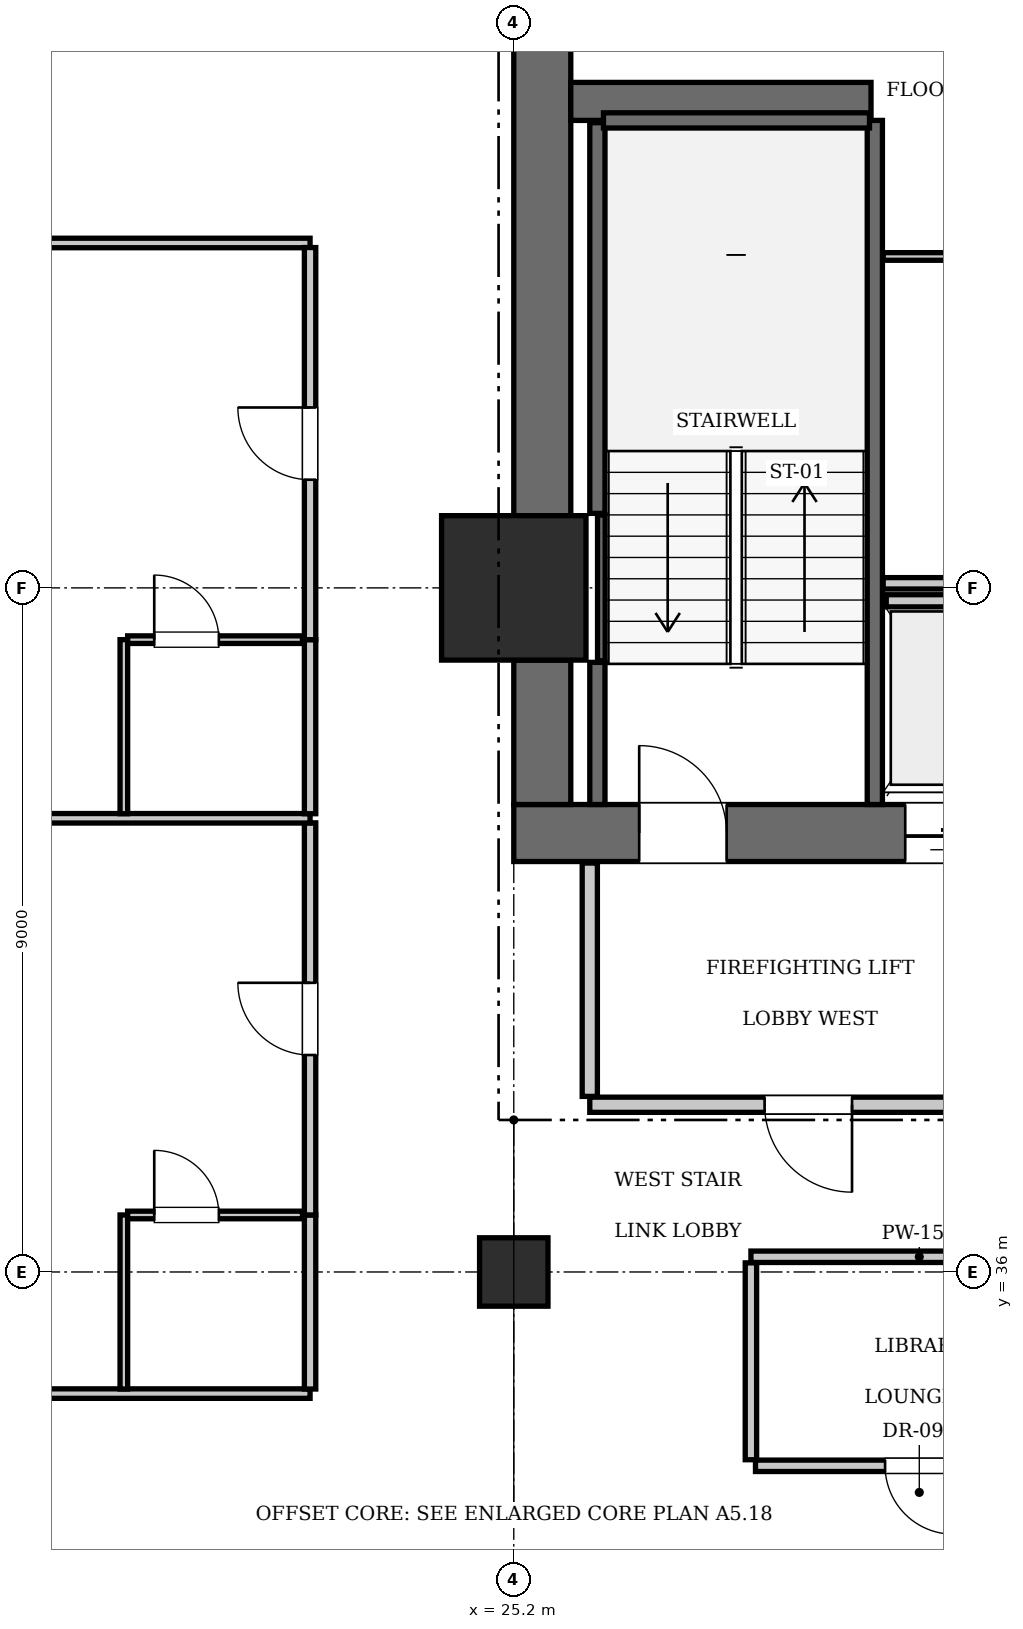
"""IFC4 building model, lengths in metres.
Left out: names, types, materials, properties, quantities, classifications, styles, units other than length and angle.
Written with IfcOpenShell. Run it as: python <this file> out.ifc"""

import sys

from ifc_helpers import new_model, si_unit, direction, frame, frame_2d, origin, origin_2d, place, context, subcontext, project, spatial, rectangle, extrude, element, fill, save


model = new_model("IFC4")
c1 = context("Model", 3, precision=1e-05, world=origin(), true_north=direction((0.0, 1.0)))
c2 = subcontext(c1, "Body", "Model", "MODEL_VIEW")
j1 = project(units=[si_unit("LENGTHUNIT", "METRE"), si_unit("PLANEANGLEUNIT", "RADIAN")], contexts=[c1])
p1 = place(None, origin())
s1 = spatial("IfcSite", under=j1, at=p1, CompositionType="ELEMENT")
p2 = place(p1, origin())
s2 = spatial("IfcBuilding", under=s1, at=p2, CompositionType="ELEMENT")
p3 = place(p2, frame((0.0, 0.0, 189.0)))
s3 = spatial("IfcBuildingStorey", under=s2, at=p3, CompositionType="ELEMENT", Elevation=189.0)
p4 = place(p3, frame((25.2, 45.0, 0.0), z_axis=(0.0, 0.0, 1.0), x_axis=(1.0, 0.0, 0.0)))
e1 = element("IfcColumn", 1, at=p4, inside=s3, PredefinedType="COLUMN", context=c2, shape_type="SweptSolid", body=[
    extrude(rectangle(XDim=1.9, YDim=1.9, at=origin_2d()), origin(), (0.0, 0.0, 1.0), 3.85),
])
p5 = place(p3, frame((25.2, 41.775, 0.0), z_axis=(0.0, 0.0, 1.0), x_axis=(1.0, 0.0, 0.0)))
e2 = element("IfcWall", 2, at=p5, inside=s3, PredefinedType="SHEAR", context=c2, shape_type="SweptSolid", body=[
    extrude(rectangle(XDim=6.8, YDim=0.75, at=frame_2d((3.4, 0.0))), origin(), (0.0, 0.0, 1.0), 3.85),
])
p6 = place(p5, frame((1.65, 0.0, 0.0)))
e3 = element("IfcOpeningElement", 3, at=p6, cuts=e2, PredefinedType="OPENING", context=c2, shape_type="SweptSolid", body=[
    extrude(rectangle(XDim=1.15, YDim=2.15, at=frame_2d((0.575, 1.075))), frame((0.0, 0.385, 0.0), z_axis=(0.0, -1.0, 0.0), x_axis=(1.0, 0.0, 0.0)), (0.0, 0.0, 1.0), 0.77),
])
p7 = place(p5, frame((5.15, 0.0, 0.0)))
e4 = element("IfcOpeningElement", 4, at=p7, cuts=e2, PredefinedType="OPENING", context=c2, shape_type="SweptSolid", body=[
    extrude(rectangle(XDim=1.1, YDim=2.2, at=frame_2d((0.55, 1.1))), frame((0.0, 0.385, 0.0), z_axis=(0.0, -1.0, 0.0), x_axis=(1.0, 0.0, 0.0)), (0.0, 0.0, 1.0), 0.77),
])
p8 = place(p3, frame((25.575, 42.15, 0.0), z_axis=(0.0, 0.0, 1.0), x_axis=(0.0, 1.0, 0.0)))
e5 = element("IfcWall", 5, at=p8, inside=s3, PredefinedType="SHEAR", context=c2, shape_type="SweptSolid", body=[
    extrude(rectangle(XDim=1.9, YDim=0.75, at=frame_2d((0.95, 0.0))), origin(), (0.0, 0.0, 1.0), 3.85),
])
p9 = place(p3, frame((25.575, 45.95, 0.0), z_axis=(0.0, 0.0, 1.0), x_axis=(0.0, 1.0, 0.0)))
e6 = element("IfcWall", 6, at=p9, inside=s3, PredefinedType="SHEAR", context=c2, shape_type="SweptSolid", body=[
    extrude(rectangle(XDim=7.3, YDim=0.75, at=frame_2d((3.65, 0.0))), origin(), (0.0, 0.0, 1.0), 3.85),
])
p10 = place(p3, frame((25.95, 51.4, 0.0), z_axis=(0.0, 0.0, 1.0), x_axis=(1.0, 0.0, 0.0)))
e7 = element("IfcWall", 7, at=p10, inside=s3, PredefinedType="SHEAR", context=c2, shape_type="SweptSolid", body=[
    extrude(rectangle(XDim=3.95, YDim=0.5, at=frame_2d((1.975, 0.0))), origin(), (0.0, 0.0, 1.0), 3.85),
])
p11 = place(p3, frame((25.2, 36.0, 0.0), z_axis=(0.0, 0.0, 1.0), x_axis=(1.0, 0.0, 0.0)))
e8 = element("IfcColumn", 8, at=p11, inside=s3, PredefinedType="COLUMN", context=c2, shape_type="SweptSolid", body=[
    extrude(rectangle(XDim=0.9, YDim=0.9, at=origin_2d()), origin(), (0.0, 0.0, 1.0), 3.85),
])
p12 = place(p3, frame((29.95, 42.15, 0.0), z_axis=(0.0, 0.0, 1.0), x_axis=(0.0, 1.0, 0.0)))
e9 = element("IfcWall", 9, at=p12, inside=s3, PredefinedType="SOLIDWALL", context=c2, shape_type="SweptSolid", body=[
    extrude(rectangle(XDim=9.0, YDim=0.2, at=frame_2d((4.5, 0.0))), origin(), (0.0, 0.0, 1.0), 3.61),
])
p13 = place(p3, frame((26.3, 42.15, 0.0), z_axis=(0.0, 0.0, 1.0), x_axis=(0.0, 1.0, 0.0)))
e10 = element("IfcWall", 10, at=p13, inside=s3, PredefinedType="SOLIDWALL", context=c2, shape_type="SweptSolid", body=[
    extrude(rectangle(XDim=1.87, YDim=0.2, at=frame_2d((0.935, 0.0))), origin(), (0.0, 0.0, 1.0), 3.61),
])
p14 = place(p3, frame((26.3, 45.98, 0.0), z_axis=(0.0, 0.0, 1.0), x_axis=(0.0, 1.0, 0.0)))
e11 = element("IfcWall", 11, at=p14, inside=s3, PredefinedType="SOLIDWALL", context=c2, shape_type="SweptSolid", body=[
    extrude(rectangle(XDim=5.14, YDim=0.2, at=frame_2d((2.57, 0.0))), origin(), (0.0, 0.0, 1.0), 3.61),
])
p15 = place(p3, frame((26.38, 51.15, 0.0), z_axis=(0.0, 0.0, 1.0), x_axis=(1.0, 0.0, 0.0)))
e12 = element("IfcWall", 12, at=p15, inside=s3, PredefinedType="SOLIDWALL", context=c2, shape_type="SweptSolid", body=[
    extrude(rectangle(XDim=3.5, YDim=0.2, at=frame_2d((1.75, 0.0))), origin(), (0.0, 0.0, 1.0), 3.61),
])
p16 = place(p3, frame((26.352, 44.04, 0.0), z_axis=(0.0, 0.0, 1.0), x_axis=(0.0, 1.0, 0.0)))
e13 = element("IfcWall", 13, at=p16, inside=s3, PredefinedType="SOLIDWALL", context=c2, shape_type="SweptSolid", body=[
    extrude(rectangle(XDim=1.92, YDim=0.1, at=frame_2d((0.96, 0.0))), origin(), (0.0, 0.0, 1.0), 3.61),
])
p17 = place(p3, frame((30.1, 44.83, 0.0), z_axis=(0.0, 0.0, 1.0), x_axis=(1.0, 0.0, 0.0)))
e14 = element("IfcWall", 14, at=p17, inside=s3, PredefinedType="SOLIDWALL", context=c2, shape_type="SweptSolid", body=[
    extrude(rectangle(XDim=1.6, YDim=0.16, at=frame_2d((0.8, 0.0))), origin(), (0.0, 0.0, 1.0), 3.61),
])
p18 = place(p3, frame((26.2, 38.2, 0.0), z_axis=(0.0, 0.0, 1.0), x_axis=(1.0, 0.0, 0.0)))
e15 = element("IfcWall", 15, at=p18, inside=s3, PredefinedType="PARTITIONING", context=c2, shape_type="SweptSolid", body=[
    extrude(rectangle(XDim=5.8, YDim=0.2, at=frame_2d((2.9, 0.0))), origin(), (0.0, 0.0, 1.0), 3.61),
])
p19 = place(p18, frame((2.3, 0.0, 0.0)))
e16 = element("IfcOpeningElement", 16, at=p19, cuts=e15, PredefinedType="OPENING", context=c2, shape_type="SweptSolid", body=[
    extrude(rectangle(XDim=1.15, YDim=2.15, at=frame_2d((0.575, 1.075))), frame((0.0, 0.11, 0.0), z_axis=(0.0, -1.0, 0.0), x_axis=(1.0, 0.0, 0.0)), (0.0, 0.0, 1.0), 0.22),
])
p20 = place(p3, frame((26.2, 38.31, 0.0), z_axis=(0.0, 0.0, 1.0), x_axis=(0.0, 1.0, 0.0)))
e17 = element("IfcWall", 17, at=p20, inside=s3, PredefinedType="PARTITIONING", context=c2, shape_type="SweptSolid", body=[
    extrude(rectangle(XDim=3.07, YDim=0.2, at=frame_2d((1.535, 0.0))), origin(), (0.0, 0.0, 1.0), 3.61),
])
p21 = place(p3, frame((30.06, 45.06, 0.0), z_axis=(0.0, 0.0, 1.0), x_axis=(1.0, 0.0, 0.0)))
e18 = element("IfcWall", 18, at=p21, inside=s3, PredefinedType="PARTITIONING", context=c2, shape_type="SweptSolid", body=[
    extrude(rectangle(XDim=3.18, YDim=0.15, at=frame_2d((1.59, 0.0))), origin(), (0.0, 0.0, 1.0), 3.61),
])
p22 = place(p3, frame((30.06, 49.36, 0.0), z_axis=(0.0, 0.0, 1.0), x_axis=(1.0, 0.0, 0.0)))
e19 = element("IfcWall", 19, at=p22, inside=s3, PredefinedType="PARTITIONING", context=c2, shape_type="SweptSolid", body=[
    extrude(rectangle(XDim=3.18, YDim=0.1, at=frame_2d((1.59, 0.0))), origin(), (0.0, 0.0, 1.0), 3.61),
])
p23 = place(p22, frame((1.95, 0.0, 0.0)))
e20 = element("IfcOpeningElement", 20, at=p23, cuts=e19, PredefinedType="OPENING", context=c2, shape_type="SweptSolid", body=[
    extrude(rectangle(XDim=0.8, YDim=2.05, at=frame_2d((0.4, 1.025))), frame((0.0, 0.06, 0.0), z_axis=(0.0, -1.0, 0.0), x_axis=(1.0, 0.0, 0.0)), (0.0, 0.0, 1.0), 0.12),
])
p24 = place(p3, frame((28.32, 36.2, 0.0), z_axis=(0.0, 0.0, 1.0), x_axis=(1.0, 0.0, 0.0)))
e21 = element("IfcWall", 21, at=p24, inside=s3, PredefinedType="PARTITIONING", context=c2, shape_type="SweptSolid", body=[
    extrude(rectangle(XDim=4.43, YDim=0.15, at=frame_2d((2.215, 0.0))), origin(), (0.0, 0.0, 1.0), 3.61),
])
p25 = place(p3, frame((28.32, 33.53, 0.0), z_axis=(0.0, 0.0, 1.0), x_axis=(0.0, 1.0, 0.0)))
e22 = element("IfcWall", 22, at=p25, inside=s3, PredefinedType="PARTITIONING", context=c2, shape_type="SweptSolid", body=[
    extrude(rectangle(XDim=2.59, YDim=0.15, at=frame_2d((1.295, 0.0))), origin(), (0.0, 0.0, 1.0), 3.61),
])
p26 = place(p3, frame((28.38, 33.45, 0.0), z_axis=(0.0, 0.0, 1.0), x_axis=(1.0, 0.0, 0.0)))
e23 = element("IfcWall", 23, at=p26, inside=s3, PredefinedType="PARTITIONING", context=c2, shape_type="SweptSolid", body=[
    extrude(rectangle(XDim=4.31, YDim=0.15, at=frame_2d((2.155, 0.0))), origin(), (0.0, 0.0, 1.0), 3.61),
])
p27 = place(p26, frame((1.705, 0.0, 0.0)))
e24 = element("IfcOpeningElement", 24, at=p27, cuts=e23, PredefinedType="OPENING", context=c2, shape_type="SweptSolid", body=[
    extrude(rectangle(XDim=0.9, YDim=2.1, at=frame_2d((0.45, 1.05))), frame((0.0, 0.085, 0.0), z_axis=(0.0, -1.0, 0.0), x_axis=(1.0, 0.0, 0.0)), (0.0, 0.0, 1.0), 0.17),
])
p28 = place(p3, frame((13.2, 34.4, 0.0), z_axis=(0.0, 0.0, 1.0), x_axis=(1.0, 0.0, 0.0)))
e25 = element("IfcWall", 25, at=p28, inside=s3, PredefinedType="PARTITIONING", context=c2, shape_type="SweptSolid", body=[
    extrude(rectangle(XDim=9.32, YDim=0.125, at=frame_2d((4.66, 0.0))), origin(), (0.0, 0.0, 1.0), 3.61),
])
p29 = place(p3, frame((17.24, 49.538, 0.0), z_axis=(0.0, 0.0, 1.0), x_axis=(1.0, 0.0, 0.0)))
e26 = element("IfcWall", 26, at=p29, inside=s3, PredefinedType="PARTITIONING", context=c2, shape_type="SweptSolid", body=[
    extrude(rectangle(XDim=5.28, YDim=0.125, at=frame_2d((2.64, 0.0))), origin(), (0.0, 0.0, 1.0), 3.61),
])
p30 = place(p3, frame((22.52, 34.46, 0.0), z_axis=(0.0, 0.0, 1.0), x_axis=(0.0, 1.0, 0.0)))
e27 = element("IfcWall", 27, at=p30, inside=s3, PredefinedType="PARTITIONING", context=c2, shape_type="SweptSolid", body=[
    extrude(rectangle(XDim=2.29, YDim=0.15, at=frame_2d((1.145, 0.0))), origin(), (0.0, 0.0, 1.0), 3.61),
])
p31 = place(p3, frame((22.52, 36.75, 0.0), z_axis=(0.0, 0.0, 1.0), x_axis=(0.0, 1.0, 0.0)))
e28 = element("IfcWall", 28, at=p31, inside=s3, PredefinedType="PARTITIONING", context=c2, shape_type="SweptSolid", body=[
    extrude(rectangle(XDim=5.159, YDim=0.15, at=frame_2d((2.579, 0.0))), origin(), (0.0, 0.0, 1.0), 3.61),
])
p32 = place(p31, frame((2.104, 0.0, 0.0)))
e29 = element("IfcOpeningElement", 29, at=p32, cuts=e28, PredefinedType="OPENING", context=c2, shape_type="SweptSolid", body=[
    extrude(rectangle(XDim=0.95, YDim=2.15, at=frame_2d((0.475, 1.075))), frame((0.0, 0.085, 0.0), z_axis=(0.0, -1.0, 0.0), x_axis=(1.0, 0.0, 0.0)), (0.0, 0.0, 1.0), 0.17),
])
p33 = place(p3, frame((20.07, 34.46, 0.0), z_axis=(0.0, 0.0, 1.0), x_axis=(0.0, 1.0, 0.0)))
e30 = element("IfcWall", 30, at=p33, inside=s3, PredefinedType="PARTITIONING", context=c2, shape_type="SweptSolid", body=[
    extrude(rectangle(XDim=2.29, YDim=0.1, at=frame_2d((1.145, 0.0))), origin(), (0.0, 0.0, 1.0), 3.61),
])
p34 = place(p3, frame((20.12, 36.75, 0.0), z_axis=(0.0, 0.0, 1.0), x_axis=(1.0, 0.0, 0.0)))
e31 = element("IfcWall", 31, at=p34, inside=s3, PredefinedType="PARTITIONING", context=c2, shape_type="SweptSolid", body=[
    extrude(rectangle(XDim=2.3, YDim=0.1, at=frame_2d((1.15, 0.0))), origin(), (0.0, 0.0, 1.0), 3.61),
])
p35 = place(p34, frame((0.35, 0.0, 0.0)))
e32 = element("IfcOpeningElement", 32, at=p35, cuts=e31, PredefinedType="OPENING", context=c2, shape_type="SweptSolid", body=[
    extrude(rectangle(XDim=0.85, YDim=2.1, at=frame_2d((0.425, 1.05))), frame((0.0, 0.06, 0.0), z_axis=(0.0, -1.0, 0.0), x_axis=(1.0, 0.0, 0.0)), (0.0, 0.0, 1.0), 0.12),
])
p36 = place(p3, frame((13.2, 41.969, 0.0), z_axis=(0.0, 0.0, 1.0), x_axis=(1.0, 0.0, 0.0)))
e33 = element("IfcWall", 33, at=p36, inside=s3, PredefinedType="PARTITIONING", context=c2, shape_type="SweptSolid", body=[
    extrude(rectangle(XDim=9.32, YDim=0.125, at=frame_2d((4.66, 0.0))), origin(), (0.0, 0.0, 1.0), 3.61),
])
p37 = place(p3, frame((22.52, 42.029, 0.0), z_axis=(0.0, 0.0, 1.0), x_axis=(0.0, 1.0, 0.0)))
e34 = element("IfcWall", 34, at=p37, inside=s3, PredefinedType="PARTITIONING", context=c2, shape_type="SweptSolid", body=[
    extrude(rectangle(XDim=2.29, YDim=0.15, at=frame_2d((1.145, 0.0))), origin(), (0.0, 0.0, 1.0), 3.61),
])
p38 = place(p3, frame((22.52, 44.319, 0.0), z_axis=(0.0, 0.0, 1.0), x_axis=(0.0, 1.0, 0.0)))
e35 = element("IfcWall", 35, at=p38, inside=s3, PredefinedType="PARTITIONING", context=c2, shape_type="SweptSolid", body=[
    extrude(rectangle(XDim=5.159, YDim=0.15, at=frame_2d((2.579, 0.0))), origin(), (0.0, 0.0, 1.0), 3.61),
])
p39 = place(p38, frame((2.104, 0.0, 0.0)))
e36 = element("IfcOpeningElement", 36, at=p39, cuts=e35, PredefinedType="OPENING", context=c2, shape_type="SweptSolid", body=[
    extrude(rectangle(XDim=0.95, YDim=2.15, at=frame_2d((0.475, 1.075))), frame((0.0, 0.085, 0.0), z_axis=(0.0, -1.0, 0.0), x_axis=(1.0, 0.0, 0.0)), (0.0, 0.0, 1.0), 0.17),
])
p40 = place(p3, frame((20.07, 42.029, 0.0), z_axis=(0.0, 0.0, 1.0), x_axis=(0.0, 1.0, 0.0)))
e37 = element("IfcWall", 37, at=p40, inside=s3, PredefinedType="PARTITIONING", context=c2, shape_type="SweptSolid", body=[
    extrude(rectangle(XDim=2.29, YDim=0.1, at=frame_2d((1.145, 0.0))), origin(), (0.0, 0.0, 1.0), 3.61),
])
p41 = place(p3, frame((20.12, 44.319, 0.0), z_axis=(0.0, 0.0, 1.0), x_axis=(1.0, 0.0, 0.0)))
e38 = element("IfcWall", 38, at=p41, inside=s3, PredefinedType="PARTITIONING", context=c2, shape_type="SweptSolid", body=[
    extrude(rectangle(XDim=2.3, YDim=0.1, at=frame_2d((1.15, 0.0))), origin(), (0.0, 0.0, 1.0), 3.61),
])
p42 = place(p41, frame((0.35, 0.0, 0.0)))
e39 = element("IfcOpeningElement", 39, at=p42, cuts=e38, PredefinedType="OPENING", context=c2, shape_type="SweptSolid", body=[
    extrude(rectangle(XDim=0.85, YDim=2.1, at=frame_2d((0.425, 1.05))), frame((0.0, 0.06, 0.0), z_axis=(0.0, -1.0, 0.0), x_axis=(1.0, 0.0, 0.0)), (0.0, 0.0, 1.0), 0.12),
])
p43 = place(p6, origin())
e40 = element("IfcDoor", 40, at=p43, inside=s3, OperationType="SINGLE_SWING_LEFT", PredefinedType="DOOR", context=c2, shape_type="SweptSolid", body=[
    extrude(rectangle(XDim=1.15, YDim=2.15, at=frame_2d((0.575, 1.075))), frame((0.0, 0.025, 0.0), z_axis=(0.0, -1.0, 0.0), x_axis=(1.0, 0.0, 0.0)), (0.0, 0.0, 1.0), 0.05),
])
fill(e3, e40)
p44 = place(p7, frame((1.1, 0.0, 0.0), z_axis=(0.0, 0.0, 1.0), x_axis=(-1.0, 0.0, 0.0)))
e41 = element("IfcDoor", 41, at=p44, inside=s3, OperationType="SLIDING_TO_LEFT", PredefinedType="DOOR", context=c2, shape_type="SweptSolid", body=[
    extrude(rectangle(XDim=1.1, YDim=2.2, at=frame_2d((0.55, 1.1))), frame((0.0, 0.025, 0.0), z_axis=(0.0, -1.0, 0.0), x_axis=(1.0, 0.0, 0.0)), (0.0, 0.0, 1.0), 0.05),
])
fill(e4, e41)
p45 = place(p19, frame((1.15, 0.0, 0.0), z_axis=(0.0, 0.0, 1.0), x_axis=(-1.0, 0.0, 0.0)))
e42 = element("IfcDoor", 42, at=p45, inside=s3, OperationType="SINGLE_SWING_LEFT", PredefinedType="DOOR", context=c2, shape_type="SweptSolid", body=[
    extrude(rectangle(XDim=1.15, YDim=2.15, at=frame_2d((0.575, 1.075))), frame((0.0, 0.025, 0.0), z_axis=(0.0, -1.0, 0.0), x_axis=(1.0, 0.0, 0.0)), (0.0, 0.0, 1.0), 0.05),
])
fill(e16, e42)
p46 = place(p27, frame((0.9, 0.0, 0.0), z_axis=(0.0, 0.0, 1.0), x_axis=(-1.0, 0.0, 0.0)))
e43 = element("IfcDoor", 43, at=p46, inside=s3, OperationType="SINGLE_SWING_LEFT", PredefinedType="DOOR", context=c2, shape_type="SweptSolid", body=[
    extrude(rectangle(XDim=0.9, YDim=2.1, at=frame_2d((0.45, 1.05))), frame((0.0, 0.025, 0.0), z_axis=(0.0, -1.0, 0.0), x_axis=(1.0, 0.0, 0.0)), (0.0, 0.0, 1.0), 0.05),
])
fill(e24, e43)
p47 = place(p35, origin())
e44 = element("IfcDoor", 44, at=p47, inside=s3, OperationType="SINGLE_SWING_LEFT", PredefinedType="DOOR", context=c2, shape_type="SweptSolid", body=[
    extrude(rectangle(XDim=0.85, YDim=2.1, at=frame_2d((0.425, 1.05))), frame((0.0, 0.025, 0.0), z_axis=(0.0, -1.0, 0.0), x_axis=(1.0, 0.0, 0.0)), (0.0, 0.0, 1.0), 0.05),
])
fill(e32, e44)
p48 = place(p32, origin())
e45 = element("IfcDoor", 45, at=p48, inside=s3, OperationType="SINGLE_SWING_RIGHT", PredefinedType="DOOR", context=c2, shape_type="SweptSolid", body=[
    extrude(rectangle(XDim=0.95, YDim=2.15, at=frame_2d((0.475, 1.075))), frame((0.0, 0.025, 0.0), z_axis=(0.0, -1.0, 0.0), x_axis=(1.0, 0.0, 0.0)), (0.0, 0.0, 1.0), 0.05),
])
fill(e29, e45)
p49 = place(p42, origin())
e46 = element("IfcDoor", 46, at=p49, inside=s3, OperationType="SINGLE_SWING_LEFT", PredefinedType="DOOR", context=c2, shape_type="SweptSolid", body=[
    extrude(rectangle(XDim=0.85, YDim=2.1, at=frame_2d((0.425, 1.05))), frame((0.0, 0.025, 0.0), z_axis=(0.0, -1.0, 0.0), x_axis=(1.0, 0.0, 0.0)), (0.0, 0.0, 1.0), 0.05),
])
fill(e39, e46)
p50 = place(p39, origin())
e47 = element("IfcDoor", 47, at=p50, inside=s3, OperationType="SINGLE_SWING_RIGHT", PredefinedType="DOOR", context=c2, shape_type="SweptSolid", body=[
    extrude(rectangle(XDim=0.95, YDim=2.15, at=frame_2d((0.475, 1.075))), frame((0.0, 0.025, 0.0), z_axis=(0.0, -1.0, 0.0), x_axis=(1.0, 0.0, 0.0)), (0.0, 0.0, 1.0), 0.05),
])
fill(e36, e47)
save(model, sys.argv[1])
